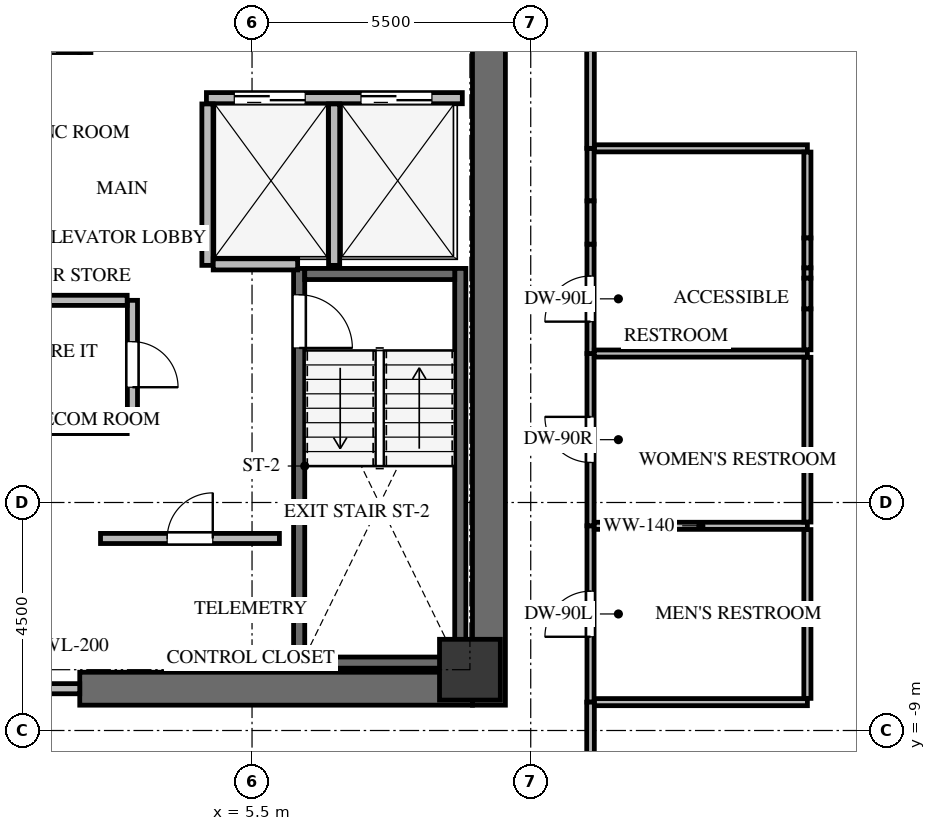
"""IFC4 building model, lengths in metres.
Left out: names, types, materials, properties, quantities, classifications, styles, units other than length and angle.
Written with IfcOpenShell. Run it as: python <this file> out.ifc"""

import sys

from ifc_helpers import new_model, si_unit, direction, frame, frame_2d, origin, origin_2d, place, context, subcontext, project, spatial, rectangle, extrude, source, transform, mapped, element, fill, save


model = new_model("IFC4")
c1 = context("Model", 3, precision=1e-05, world=origin(), true_north=direction((0.0, 1.0)))
c2 = subcontext(c1, "Body", "Model", "MODEL_VIEW")
j1 = project(units=[si_unit("LENGTHUNIT", "METRE"), si_unit("PLANEANGLEUNIT", "RADIAN")], contexts=[c1])
p1 = place(None, origin())
s1 = spatial("IfcSite", under=j1, at=p1, CompositionType="ELEMENT")
p2 = place(p1, origin())
s2 = spatial("IfcBuilding", under=s1, at=p2, CompositionType="ELEMENT")
p3 = place(p2, frame((0.0, 0.0, 206.2)))
s3 = spatial("IfcBuildingStorey", under=s2, at=p3, CompositionType="ELEMENT", Elevation=206.2)
p4 = place(p3, frame((10.175, -8.5, 0.0), z_axis=(0.0, 0.0, 1.0), x_axis=(0.0, 1.0, 0.0)))
e1 = element("IfcWall", 1, at=p4, inside=s3, PredefinedType="SHEAR", context=c2, shape_type="SweptSolid", body=[
    extrude(rectangle(XDim=17.0, YDim=0.65, at=frame_2d((8.5, 0.0))), origin(), (0.0, 0.0, 1.0), 3.0),
])
p5 = place(p3, frame((2.1, -8.175, 0.0), z_axis=(0.0, 0.0, 1.0), x_axis=(1.0, 0.0, 0.0)))
e2 = element("IfcWall", 2, at=p5, inside=s3, PredefinedType="SHEAR", context=c2, shape_type="SweptSolid", body=[
    extrude(rectangle(XDim=7.75, YDim=0.65, at=frame_2d((3.875, 0.0))), origin(), (0.0, 0.0, 1.0), 3.0),
])
p6 = place(p3, frame((9.61, -7.77, -0.24), z_axis=(0.0, 0.0, 1.0), x_axis=(0.0, 1.0, 0.0)))
e3 = element("IfcWall", 3, at=p6, inside=s3, PredefinedType="SHEAR", context=c2, shape_type="SweptSolid", body=[
    extrude(rectangle(XDim=7.89, YDim=0.22, at=frame_2d((3.945, 0.0))), origin(), (0.0, 0.0, 1.0), 3.0),
])
p7 = place(p3, frame((6.43, 0.12, -0.24), z_axis=(0.0, 0.0, 1.0), x_axis=(0.0, -1.0, 0.0)))
e4 = element("IfcWall", 4, at=p7, inside=s3, PredefinedType="SHEAR", context=c2, shape_type="SweptSolid", body=[
    extrude(rectangle(XDim=7.89, YDim=0.22, at=frame_2d((3.945, 0.0))), origin(), (0.0, 0.0, 1.0), 3.0),
])
p8 = place(p7, frame((0.52, 0.0, 0.0)))
e5 = element("IfcOpeningElement", 5, at=p8, cuts=e4, PredefinedType="OPENING", context=c2, shape_type="SweptSolid", body=[
    extrude(rectangle(XDim=1.05, YDim=2.15, at=frame_2d((0.525, 1.075))), frame((0.0, 0.12, 0.0), z_axis=(0.0, -1.0, 0.0), x_axis=(1.0, 0.0, 0.0)), (0.0, 0.0, 1.0), 0.24),
])
for number, where, z_axis, x_axis in (
    (6, (6.54, -7.66, -0.24), (0.0, 0.0, 1.0), (1.0, 0.0, 0.0)),
    (7, (9.5, 0.01, -0.24), (0.0, 0.0, 1.0), (-1.0, 0.0, 0.0)),
):
    element("IfcWall", number, at=place(p3, frame(where, z_axis=z_axis, x_axis=x_axis)), inside=s3, PredefinedType="SHEAR", context=c2, shape_type="SweptSolid", body=[
        extrude(rectangle(XDim=2.96, YDim=0.22, at=frame_2d((1.48, 0.0))), origin(), (0.0, 0.0, 1.0), 3.0),
    ])
p9 = place(p3, frame((2.21, 4.38, -0.24), z_axis=(0.0, 0.0, 1.0), x_axis=(0.0, 1.0, 0.0)))
e8 = element("IfcWall", 8, at=p9, inside=s3, PredefinedType="SHEAR", context=c2, shape_type="SweptSolid", body=[
    extrude(rectangle(XDim=3.4, YDim=0.22, at=frame_2d((1.7, 0.0))), origin(), (0.0, 0.0, 1.0), 3.0),
])
p10 = place(p3, frame((-5.25, 4.49, -0.24), z_axis=(0.0, 0.0, 1.0), x_axis=(1.0, 0.0, 0.0)))
e9 = element("IfcWall", 9, at=p10, inside=s3, PredefinedType="SHEAR", context=c2, shape_type="SweptSolid", body=[
    extrude(rectangle(XDim=7.35, YDim=0.22, at=frame_2d((3.675, 0.0))), origin(), (0.0, 0.0, 1.0), 3.0),
])
p11 = place(p10, frame((5.85, 0.0, 0.0)))
e10 = element("IfcOpeningElement", 10, at=p11, cuts=e9, PredefinedType="OPENING", context=c2, shape_type="SweptSolid", body=[
    extrude(rectangle(XDim=1.05, YDim=2.15, at=frame_2d((0.525, 1.075))), frame((0.0, 0.12, 0.0), z_axis=(0.0, -1.0, 0.0), x_axis=(1.0, 0.0, 0.0)), (0.0, 0.0, 1.0), 0.24),
])
m1 = source(origin(), c2, "Body", "SweptSolid", [
    extrude(rectangle(XDim=1.2, YDim=1.2, at=origin_2d()), origin(), (0.0, 0.0, 1.0), 3.0),
])
p12 = place(p3, frame((9.8, -7.8, -0.24), z_axis=(0.0, 0.0, 1.0), x_axis=(1.0, 0.0, 0.0)))
e11 = element("IfcColumn", 11, at=p12, inside=s3, PredefinedType="COLUMN", context=c2, shape_type="MappedRepresentation", body=[
    mapped(m1, transform((0.0, 0.0, 0.0), x_axis=(1.0, 0.0, 0.0), y_axis=(0.0, 1.0, 0.0), z_axis=(0.0, 0.0, 1.0), scale=1.0)),
])
p13 = place(p3, frame((-2.1, -8.175, 0.0), z_axis=(0.0, 0.0, 1.0), x_axis=(1.0, 0.0, 0.0)))
e12 = element("IfcWall", 12, at=p13, inside=s3, PredefinedType="SOLIDWALL", context=c2, shape_type="SweptSolid", body=[
    extrude(rectangle(XDim=4.2, YDim=0.2, at=frame_2d((2.1, 0.0))), origin(), (0.0, 0.0, 1.0), 2.745),
])
p14 = place(p13, frame((1.2, 0.0, 0.0)))
e13 = element("IfcOpeningElement", 13, at=p14, cuts=e12, PredefinedType="OPENING", context=c2, shape_type="SweptSolid", body=[
    extrude(rectangle(XDim=1.8, YDim=2.15, at=frame_2d((0.9, 1.075))), frame((0.0, 0.11, 0.0), z_axis=(0.0, -1.0, 0.0), x_axis=(1.0, 0.0, 0.0)), (0.0, 0.0, 1.0), 0.22),
])
p15 = place(p3, frame((4.6, 3.48, 0.0), z_axis=(0.0, 0.0, 1.0), x_axis=(1.0, 0.0, 0.0)))
e14 = element("IfcWall", 14, at=p15, inside=s3, PredefinedType="SOLIDWALL", context=c2, shape_type="SweptSolid", body=[
    extrude(rectangle(XDim=5.05, YDim=0.22, at=frame_2d((2.525, 0.0))), origin(), (0.0, 0.0, 1.0), 2.745),
])
p16 = place(p15, frame((0.55, 0.0, 0.0)))
e15 = element("IfcOpeningElement", 15, at=p16, cuts=e14, PredefinedType="OPENING", context=c2, shape_type="SweptSolid", body=[
    extrude(rectangle(XDim=1.4, YDim=2.15, at=frame_2d((0.7, 1.075))), frame((0.0, 0.12, 0.0), z_axis=(0.0, -1.0, 0.0), x_axis=(1.0, 0.0, 0.0)), (0.0, 0.0, 1.0), 0.24),
])
p17 = place(p15, frame((3.05, 0.0, 0.0)))
e16 = element("IfcOpeningElement", 16, at=p17, cuts=e14, PredefinedType="OPENING", context=c2, shape_type="SweptSolid", body=[
    extrude(rectangle(XDim=1.4, YDim=2.15, at=frame_2d((0.7, 1.075))), frame((0.0, 0.12, 0.0), z_axis=(0.0, -1.0, 0.0), x_axis=(1.0, 0.0, 0.0)), (0.0, 0.0, 1.0), 0.24),
])
for number, where, z_axis, x_axis in (
    (17, (4.62, 0.18, 0.0), (0.0, 0.0, 1.0), (0.0, 1.0, 0.0)),
    (18, (7.12, 0.18, 0.0), (0.0, 0.0, 1.0), (0.0, 1.0, 0.0)),
):
    element("IfcWall", number, at=place(p3, frame(where, z_axis=z_axis, x_axis=x_axis)), inside=s3, PredefinedType="SOLIDWALL", context=c2, shape_type="SweptSolid", body=[
        extrude(rectangle(XDim=3.186, YDim=0.22, at=frame_2d((1.593, 0.0))), origin(), (0.0, 0.0, 1.0), 2.745),
    ])
p18 = place(p3, frame((4.734, 0.2, 0.0), z_axis=(0.0, 0.0, 1.0), x_axis=(1.0, 0.0, 0.0)))
e19 = element("IfcWall", 19, at=p18, inside=s3, PredefinedType="SOLIDWALL", context=c2, shape_type="SweptSolid", body=[
    extrude(rectangle(XDim=1.666, YDim=0.22, at=frame_2d((0.833, 0.0))), origin(), (0.0, 0.0, 1.0), 2.745),
])
p19 = place(p3, frame((2.51, -5.21, 0.0), z_axis=(0.0, 0.0, 1.0), x_axis=(1.0, 0.0, 0.0)))
e20 = element("IfcWall", 20, at=p19, inside=s3, PredefinedType="SOLIDWALL", context=c2, shape_type="SweptSolid", body=[
    extrude(rectangle(XDim=3.53, YDim=0.2, at=frame_2d((1.765, 0.0))), origin(), (0.0, 0.0, 1.0), 2.745),
])
p20 = place(p19, frame((1.315, 0.0, 0.0)))
e21 = element("IfcOpeningElement", 21, at=p20, cuts=e20, PredefinedType="OPENING", context=c2, shape_type="SweptSolid", body=[
    extrude(rectangle(XDim=0.9, YDim=2.05, at=frame_2d((0.45, 1.025))), frame((0.0, 0.11, 0.0), z_axis=(0.0, -1.0, 0.0), x_axis=(1.0, 0.0, 0.0)), (0.0, 0.0, 1.0), 0.22),
])
p21 = place(p3, frame((3.14, -0.51, 0.0), z_axis=(0.0, 0.0, 1.0), x_axis=(0.0, -1.0, 0.0)))
e22 = element("IfcWall", 22, at=p21, inside=s3, PredefinedType="SOLIDWALL", context=c2, shape_type="SweptSolid", body=[
    extrude(rectangle(XDim=2.53, YDim=0.2, at=frame_2d((1.265, 0.0))), origin(), (0.0, 0.0, 1.0), 2.745),
])
p22 = place(p21, frame((0.815, 0.0, 0.0)))
e23 = element("IfcOpeningElement", 23, at=p22, cuts=e22, PredefinedType="OPENING", context=c2, shape_type="SweptSolid", body=[
    extrude(rectangle(XDim=0.9, YDim=2.05, at=frame_2d((0.45, 1.025))), frame((0.0, 0.11, 0.0), z_axis=(0.0, -1.0, 0.0), x_axis=(1.0, 0.0, 0.0)), (0.0, 0.0, 1.0), 0.22),
])
for number, where, z_axis, x_axis in (
    (24, (3.036, -3.04, 0.0), (0.0, 0.0, 1.0), (-1.0, 0.0, 0.0)),
    (25, (1.21, -0.51, 0.0), (0.0, 0.0, 1.0), (1.0, 0.0, 0.0)),
):
    element("IfcWall", number, at=place(p3, frame(where, z_axis=z_axis, x_axis=x_axis)), inside=s3, PredefinedType="SOLIDWALL", context=c2, shape_type="SweptSolid", body=[
        extrude(rectangle(XDim=1.826, YDim=0.2, at=frame_2d((0.913, 0.0))), origin(), (0.0, 0.0, 1.0), 2.745),
    ])
p23 = place(p3, frame((12.18, -8.44, 0.0), z_axis=(0.0, 0.0, 1.0), x_axis=(0.0, 1.0, 0.0)))
e26 = element("IfcWall", 26, at=p23, inside=s3, PredefinedType="PARTITIONING", context=c2, shape_type="SweptSolid", body=[
    extrude(rectangle(XDim=3.48, YDim=0.14, at=frame_2d((1.74, 0.0))), origin(), (0.0, 0.0, 1.0), 2.745),
])
p24 = place(p23, frame((1.29, 0.0, 0.0)))
e27 = element("IfcOpeningElement", 27, at=p24, cuts=e26, PredefinedType="OPENING", context=c2, shape_type="SweptSolid", body=[
    extrude(rectangle(XDim=0.9, YDim=2.05, at=frame_2d((0.45, 1.025))), frame((0.0, 0.08, 0.0), z_axis=(0.0, -1.0, 0.0), x_axis=(1.0, 0.0, 0.0)), (0.0, 0.0, 1.0), 0.16),
])
p25 = place(p3, frame((12.18, -4.96, 0.0), z_axis=(0.0, 0.0, 1.0), x_axis=(0.0, 1.0, 0.0)))
e28 = element("IfcWall", 28, at=p25, inside=s3, PredefinedType="PARTITIONING", context=c2, shape_type="SweptSolid", body=[
    extrude(rectangle(XDim=3.4, YDim=0.14, at=frame_2d((1.7, 0.0))), origin(), (0.0, 0.0, 1.0), 2.745),
])
p26 = place(p25, frame((1.25, 0.0, 0.0)))
e29 = element("IfcOpeningElement", 29, at=p26, cuts=e28, PredefinedType="OPENING", context=c2, shape_type="SweptSolid", body=[
    extrude(rectangle(XDim=0.9, YDim=2.05, at=frame_2d((0.45, 1.025))), frame((0.0, 0.08, 0.0), z_axis=(0.0, -1.0, 0.0), x_axis=(1.0, 0.0, 0.0)), (0.0, 0.0, 1.0), 0.16),
])
p27 = place(p3, frame((12.18, -1.56, 0.0), z_axis=(0.0, 0.0, 1.0), x_axis=(0.0, 1.0, 0.0)))
e30 = element("IfcWall", 30, at=p27, inside=s3, PredefinedType="PARTITIONING", context=c2, shape_type="SweptSolid", body=[
    extrude(rectangle(XDim=2.159, YDim=0.14, at=frame_2d((1.08, 0.0))), origin(), (0.0, 0.0, 1.0), 2.745),
])
p28 = place(p27, frame((0.629, 0.0, 0.0)))
e31 = element("IfcOpeningElement", 31, at=p28, cuts=e30, PredefinedType="OPENING", context=c2, shape_type="SweptSolid", body=[
    extrude(rectangle(XDim=0.9, YDim=2.05, at=frame_2d((0.45, 1.025))), frame((0.0, 0.08, 0.0), z_axis=(0.0, -1.0, 0.0), x_axis=(1.0, 0.0, 0.0)), (0.0, 0.0, 1.0), 0.16),
])
p29 = place(p3, frame((12.18, 1.452, 0.0), z_axis=(0.0, 0.0, 1.0), x_axis=(0.0, 1.0, 0.0)))
e32 = element("IfcWall", 32, at=p29, inside=s3, PredefinedType="PARTITIONING", context=c2, shape_type="SweptSolid", body=[
    extrude(rectangle(XDim=1.038, YDim=0.14, at=frame_2d((0.519, 0.0))), origin(), (0.0, 0.0, 1.0), 2.745),
])
p30 = place(p3, frame((12.18, 0.599, 0.0), z_axis=(0.0, 0.0, 1.0), x_axis=(0.0, 1.0, 0.0)))
e33 = element("IfcWall", 33, at=p30, inside=s3, PredefinedType="PARTITIONING", context=c2, shape_type="SweptSolid", body=[
    extrude(rectangle(XDim=0.853, YDim=0.14, at=frame_2d((0.427, 0.0))), origin(), (0.0, 0.0, 1.0), 1.942),
])
p31 = place(p3, frame((12.18, 2.49, 0.0), z_axis=(0.0, 0.0, 1.0), x_axis=(0.0, 1.0, 0.0)))
e34 = element("IfcWall", 34, at=p31, inside=s3, PredefinedType="PARTITIONING", context=c2, shape_type="SweptSolid", body=[
    extrude(rectangle(XDim=7.611, YDim=0.15, at=frame_2d((3.806, 0.0))), origin(), (0.0, 0.0, 1.0), 2.745),
])
p32 = place(p31, frame((3.345, 0.0, 0.0)))
e35 = element("IfcOpeningElement", 35, at=p32, cuts=e34, PredefinedType="OPENING", context=c2, shape_type="SweptSolid", body=[
    extrude(rectangle(XDim=0.92, YDim=2.1, at=frame_2d((0.46, 1.05))), frame((0.0, 0.085, 0.0), z_axis=(0.0, -1.0, 0.0), x_axis=(1.0, 0.0, 0.0)), (0.0, 0.0, 1.0), 0.17),
])
p33 = place(p3, frame((12.18, -10.101, 0.0), z_axis=(0.0, 0.0, 1.0), x_axis=(0.0, 1.0, 0.0)))
e36 = element("IfcWall", 36, at=p33, inside=s3, PredefinedType="PARTITIONING", context=c2, shape_type="SweptSolid", body=[
    extrude(rectangle(XDim=1.661, YDim=0.15, at=frame_2d((0.831, 0.0))), origin(), (0.0, 0.0, 1.0), 2.745),
])
p34 = place(p3, frame((12.254, -4.96, 0.0), z_axis=(0.0, 0.0, 1.0), x_axis=(1.0, 0.0, 0.0)))
e37 = element("IfcWall", 37, at=p34, inside=s3, PredefinedType="PARTITIONING", context=c2, shape_type="SweptSolid", body=[
    extrude(rectangle(XDim=4.206, YDim=0.14, at=frame_2d((2.103, 0.0))), origin(), (0.0, 0.0, 1.0), 2.745),
])
p35 = place(p3, frame((16.46, -8.44, 0.0), z_axis=(0.0, 0.0, 1.0), x_axis=(-1.0, 0.0, 0.0)))
e38 = element("IfcWall", 38, at=p35, inside=s3, PredefinedType="PARTITIONING", context=c2, shape_type="SweptSolid", body=[
    extrude(rectangle(XDim=4.201, YDim=0.14, at=frame_2d((2.101, 0.0))), origin(), (0.0, 0.0, 1.0), 2.745),
])
p36 = place(p3, frame((16.46, -5.034, 0.0), z_axis=(0.0, 0.0, 1.0), x_axis=(0.0, -1.0, 0.0)))
e39 = element("IfcWall", 39, at=p36, inside=s3, PredefinedType="PARTITIONING", context=c2, shape_type="SweptSolid", body=[
    extrude(rectangle(XDim=3.332, YDim=0.14, at=frame_2d((1.666, 0.0))), origin(), (0.0, 0.0, 1.0), 2.745),
])
p37 = place(p3, frame((12.254, -1.56, 0.0), z_axis=(0.0, 0.0, 1.0), x_axis=(1.0, 0.0, 0.0)))
e40 = element("IfcWall", 40, at=p37, inside=s3, PredefinedType="PARTITIONING", context=c2, shape_type="SweptSolid", body=[
    extrude(rectangle(XDim=4.206, YDim=0.14, at=frame_2d((2.103, 0.0))), origin(), (0.0, 0.0, 1.0), 2.745),
])
p38 = place(p3, frame((16.46, -1.634, 0.0), z_axis=(0.0, 0.0, 1.0), x_axis=(0.0, -1.0, 0.0)))
e41 = element("IfcWall", 41, at=p38, inside=s3, PredefinedType="PARTITIONING", context=c2, shape_type="SweptSolid", body=[
    extrude(rectangle(XDim=3.252, YDim=0.14, at=frame_2d((1.626, 0.0))), origin(), (0.0, 0.0, 1.0), 2.745),
])
p39 = place(p3, frame((12.259, 2.49, 0.0), z_axis=(0.0, 0.0, 1.0), x_axis=(1.0, 0.0, 0.0)))
e42 = element("IfcWall", 42, at=p39, inside=s3, PredefinedType="PARTITIONING", context=c2, shape_type="SweptSolid", body=[
    extrude(rectangle(XDim=4.201, YDim=0.14, at=frame_2d((2.101, 0.0))), origin(), (0.0, 0.0, 1.0), 2.745),
])
p40 = place(p3, frame((16.46, 2.416, 0.0), z_axis=(0.0, 0.0, 1.0), x_axis=(0.0, -1.0, 0.0)))
e43 = element("IfcWall", 43, at=p40, inside=s3, PredefinedType="PARTITIONING", context=c2, shape_type="SweptSolid", body=[
    extrude(rectangle(XDim=1.696, YDim=0.14, at=frame_2d((0.848, 0.0))), origin(), (0.0, 0.0, 1.0), 2.745),
])
p41 = place(p3, frame((16.46, 0.131, 0.0), z_axis=(0.0, 0.0, 1.0), x_axis=(0.0, -1.0, 0.0)))
e44 = element("IfcWall", 44, at=p41, inside=s3, PredefinedType="PARTITIONING", context=c2, shape_type="SweptSolid", body=[
    extrude(rectangle(XDim=0.203, YDim=0.14, at=frame_2d((0.102, 0.0))), origin(), (0.0, 0.0, 1.0), 2.745),
])
p42 = place(p3, frame((16.46, -0.678, 0.0), z_axis=(0.0, 0.0, 1.0), x_axis=(0.0, -1.0, 0.0)))
e45 = element("IfcWall", 45, at=p42, inside=s3, PredefinedType="PARTITIONING", context=c2, shape_type="SweptSolid", body=[
    extrude(rectangle(XDim=0.808, YDim=0.14, at=frame_2d((0.404, 0.0))), origin(), (0.0, 0.0, 1.0), 2.745),
])
p43 = place(p3, frame((16.46, 0.72, 0.0), z_axis=(0.0, 0.0, 1.0), x_axis=(0.0, -1.0, 0.0)))
e46 = element("IfcWall", 46, at=p43, inside=s3, PredefinedType="PARTITIONING", context=c2, shape_type="SweptSolid", body=[
    extrude(rectangle(XDim=0.589, YDim=0.14, at=frame_2d((0.294, 0.0))), origin(), (0.0, 0.0, 1.0), 1.942),
])
p44 = place(p3, frame((16.46, -0.072, 0.0), z_axis=(0.0, 0.0, 1.0), x_axis=(0.0, -1.0, 0.0)))
e47 = element("IfcWall", 47, at=p44, inside=s3, PredefinedType="PARTITIONING", context=c2, shape_type="SweptSolid", body=[
    extrude(rectangle(XDim=0.606, YDim=0.14, at=frame_2d((0.303, 0.0))), origin(), (0.0, 0.0, 1.0), 1.942),
])
m2 = source(origin(), c2, "Body", "SweptSolid", [
    extrude(rectangle(XDim=1.05, YDim=2.15, at=frame_2d((0.525, 1.075))), frame((0.0, 0.025, 0.0), z_axis=(0.0, -1.0, 0.0), x_axis=(1.0, 0.0, 0.0)), (0.0, 0.0, 1.0), 0.05),
])
p45 = place(p8, origin())
e48 = element("IfcDoor", 48, at=p45, inside=s3, OperationType="SINGLE_SWING_RIGHT", PredefinedType="DOOR", context=c2, shape_type="MappedRepresentation", body=[
    mapped(m2, transform((0.0, 0.0, 0.0), x_axis=(1.0, 0.0, 0.0), y_axis=(0.0, 1.0, 0.0), z_axis=(0.0, 0.0, 1.0), scale=1.0)),
])
fill(e5, e48)
m3 = source(origin(), c2, "Body", "SweptSolid", [
    extrude(rectangle(XDim=1.4, YDim=2.15, at=frame_2d((0.7, 1.075))), frame((0.0, 0.025, 0.0), z_axis=(0.0, -1.0, 0.0), x_axis=(1.0, 0.0, 0.0)), (0.0, 0.0, 1.0), 0.05),
])
p46 = place(p16, origin())
e49 = element("IfcDoor", 49, at=p46, inside=s3, OperationType="DOUBLE_DOOR_SLIDING", PredefinedType="DOOR", context=c2, shape_type="MappedRepresentation", body=[
    mapped(m3, transform((0.0, 0.0, 0.0), x_axis=(1.0, 0.0, 0.0), y_axis=(0.0, 1.0, 0.0), z_axis=(0.0, 0.0, 1.0), scale=1.0)),
])
fill(e15, e49)
p47 = place(p17, origin())
e50 = element("IfcDoor", 50, at=p47, inside=s3, OperationType="DOUBLE_DOOR_SLIDING", PredefinedType="DOOR", context=c2, shape_type="MappedRepresentation", body=[
    mapped(m3, transform((0.0, 0.0, 0.0), x_axis=(1.0, 0.0, 0.0), y_axis=(0.0, 1.0, 0.0), z_axis=(0.0, 0.0, 1.0), scale=1.0)),
])
fill(e16, e50)
m4 = source(origin(), c2, "Body", "SweptSolid", [
    extrude(rectangle(XDim=0.9, YDim=2.05, at=frame_2d((0.45, 1.025))), frame((0.0, 0.025, 0.0), z_axis=(0.0, -1.0, 0.0), x_axis=(1.0, 0.0, 0.0)), (0.0, 0.0, 1.0), 0.05),
])
p48 = place(p20, origin())
e51 = element("IfcDoor", 51, at=p48, inside=s3, OperationType="SINGLE_SWING_RIGHT", PredefinedType="DOOR", context=c2, shape_type="MappedRepresentation", body=[
    mapped(m4, transform((0.0, 0.0, 0.0), x_axis=(1.0, 0.0, 0.0), y_axis=(0.0, 1.0, 0.0), z_axis=(0.0, 0.0, 1.0), scale=1.0)),
])
fill(e21, e51)
p49 = place(p22, origin())
e52 = element("IfcDoor", 52, at=p49, inside=s3, OperationType="SINGLE_SWING_RIGHT", PredefinedType="DOOR", context=c2, shape_type="MappedRepresentation", body=[
    mapped(m4, transform((0.0, 0.0, 0.0), x_axis=(1.0, 0.0, 0.0), y_axis=(0.0, 1.0, 0.0), z_axis=(0.0, 0.0, 1.0), scale=1.0)),
])
fill(e23, e52)
m5 = source(origin(), c2, "Body", "SweptSolid", [
    extrude(rectangle(XDim=0.9, YDim=2.05, at=frame_2d((0.45, 1.025))), frame((0.0, 0.025, 0.0), z_axis=(0.0, -1.0, 0.0), x_axis=(1.0, 0.0, 0.0)), (0.0, 0.0, 1.0), 0.05),
])
p50 = place(p24, origin())
e53 = element("IfcDoor", 53, at=p50, inside=s3, OperationType="SINGLE_SWING_LEFT", PredefinedType="DOOR", context=c2, shape_type="MappedRepresentation", body=[
    mapped(m5, transform((0.0, 0.0, 0.0), x_axis=(1.0, 0.0, 0.0), y_axis=(0.0, 1.0, 0.0), z_axis=(0.0, 0.0, 1.0), scale=1.0)),
])
fill(e27, e53)
m6 = source(origin(), c2, "Body", "SweptSolid", [
    extrude(rectangle(XDim=0.9, YDim=2.05, at=frame_2d((0.45, 1.025))), frame((0.0, 0.025, 0.0), z_axis=(0.0, -1.0, 0.0), x_axis=(1.0, 0.0, 0.0)), (0.0, 0.0, 1.0), 0.05),
])
p51 = place(p26, origin())
e54 = element("IfcDoor", 54, at=p51, inside=s3, OperationType="SINGLE_SWING_RIGHT", PredefinedType="DOOR", context=c2, shape_type="MappedRepresentation", body=[
    mapped(m6, transform((0.0, 0.0, 0.0), x_axis=(1.0, 0.0, 0.0), y_axis=(0.0, 1.0, 0.0), z_axis=(0.0, 0.0, 1.0), scale=1.0)),
])
fill(e29, e54)
p52 = place(p28, origin())
e55 = element("IfcDoor", 55, at=p52, inside=s3, OperationType="SINGLE_SWING_LEFT", PredefinedType="DOOR", context=c2, shape_type="MappedRepresentation", body=[
    mapped(m5, transform((0.0, 0.0, 0.0), x_axis=(1.0, 0.0, 0.0), y_axis=(0.0, 1.0, 0.0), z_axis=(0.0, 0.0, 1.0), scale=1.0)),
])
fill(e31, e55)
save(model, sys.argv[1])
